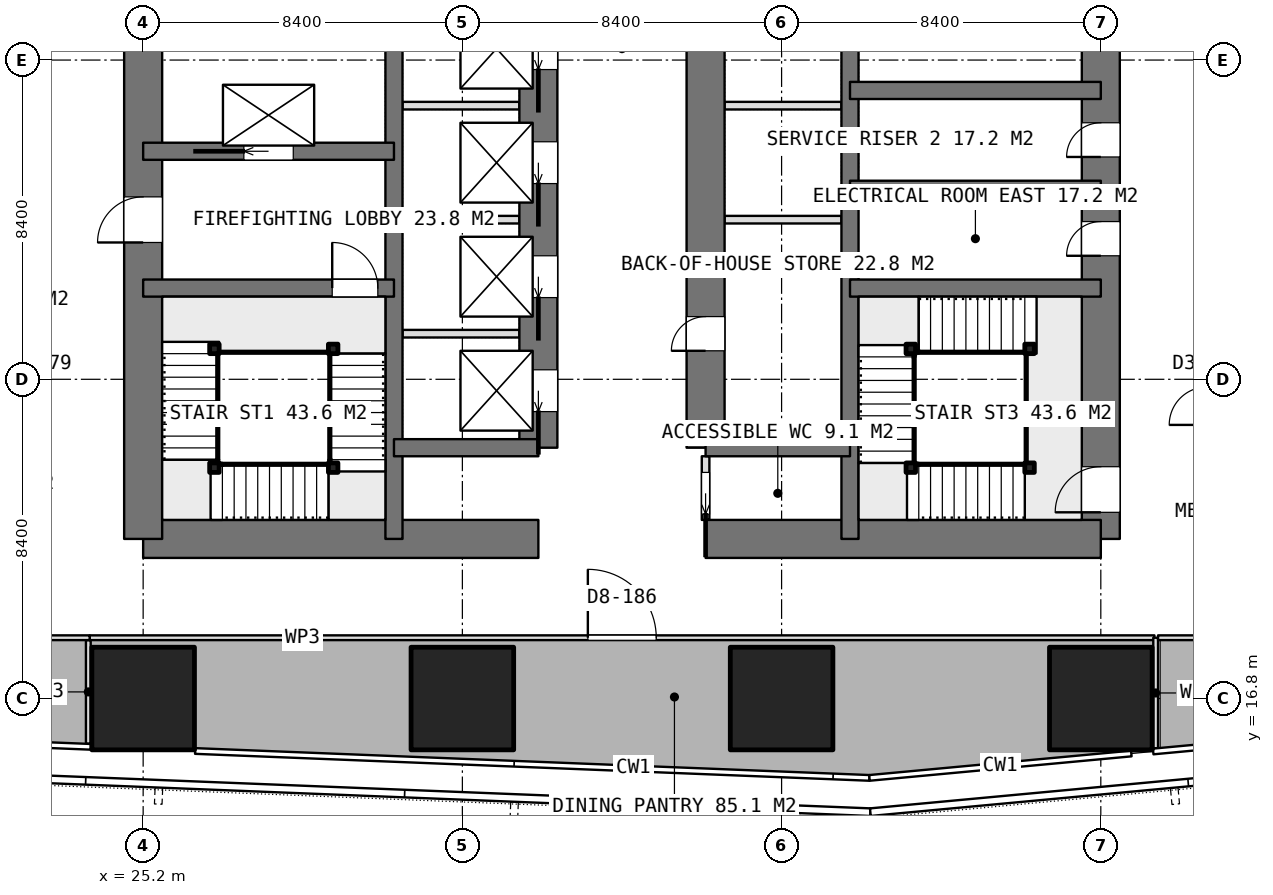
"""IFC4 building model, lengths in metres.
Left out: names, types, materials, properties, quantities, classifications, styles, units other than length and angle.
Written with IfcOpenShell. Run it as: python <this file> out.ifc"""

import sys

from ifc_helpers import new_model, si_unit, direction, frame, frame_2d, origin, origin_2d, place, context, subcontext, project, spatial, rectangle, extrude, element, fill, save


model = new_model("IFC4")
c1 = context("Model", 3, precision=1e-05, world=origin(), true_north=direction((0.0, 1.0)))
c2 = subcontext(c1, "Body", "Model", "MODEL_VIEW")
j1 = project(units=[si_unit("LENGTHUNIT", "METRE"), si_unit("PLANEANGLEUNIT", "RADIAN")], contexts=[c1])
p1 = place(None, origin())
s1 = spatial("IfcSite", under=j1, at=p1, CompositionType="ELEMENT")
p2 = place(p1, origin())
s2 = spatial("IfcBuilding", under=s1, at=p2, CompositionType="ELEMENT")
p3 = place(p2, frame((0.0, 0.0, 172.7)))
s3 = spatial("IfcBuildingStorey", under=s2, at=p3, CompositionType="ELEMENT", Elevation=172.7)
p4 = place(p3, frame((25.2, 21.0, 0.0), z_axis=(0.0, 0.0, 1.0), x_axis=(1.0, 0.0, 0.0)))
e1 = element("IfcWall", 1, at=p4, inside=s3, PredefinedType="SHEAR", context=c2, shape_type="SweptSolid", body=[
    extrude(rectangle(XDim=10.4, YDim=1.0, at=frame_2d((5.2, 0.0))), origin(), (0.0, 0.0, 1.0), 3.75),
])
p5 = place(p3, frame((40.0, 21.0, 0.0), z_axis=(0.0, 0.0, 1.0), x_axis=(1.0, 0.0, 0.0)))
e2 = element("IfcWall", 2, at=p5, inside=s3, PredefinedType="SHEAR", context=c2, shape_type="SweptSolid", body=[
    extrude(rectangle(XDim=10.4, YDim=1.0, at=frame_2d((5.2, 0.0))), origin(), (0.0, 0.0, 1.0), 3.75),
])
p6 = place(p3, frame((25.2, 21.0, 0.0), z_axis=(0.0, 0.0, 1.0), x_axis=(0.0, 1.0, 0.0)))
e3 = element("IfcWall", 3, at=p6, inside=s3, PredefinedType="SHEAR", context=c2, shape_type="SweptSolid", body=[
    extrude(rectangle(XDim=25.2, YDim=1.0, at=frame_2d((12.6, 0.0))), origin(), (0.0, 0.0, 1.0), 3.75),
])
p7 = place(p6, frame((7.8, 0.0, 0.0)))
e4 = element("IfcOpeningElement", 4, at=p7, cuts=e3, PredefinedType="OPENING", context=c2, shape_type="SweptSolid", body=[
    extrude(rectangle(XDim=1.2, YDim=2.1, at=frame_2d((0.6, 1.05))), frame((0.0, 0.51, 0.0), z_axis=(0.0, -1.0, 0.0), x_axis=(1.0, 0.0, 0.0)), (0.0, 0.0, 1.0), 1.02),
])
p8 = place(p6, frame((14.25, 0.0, 0.0)))
e5 = element("IfcOpeningElement", 5, at=p8, cuts=e3, PredefinedType="OPENING", context=c2, shape_type="SweptSolid", body=[
    extrude(rectangle(XDim=0.9, YDim=2.1, at=frame_2d((0.45, 1.05))), frame((0.0, 0.51, 0.0), z_axis=(0.0, -1.0, 0.0), x_axis=(1.0, 0.0, 0.0)), (0.0, 0.0, 1.0), 1.02),
])
p9 = place(p6, frame((16.85, 0.0, 0.0)))
e6 = element("IfcOpeningElement", 6, at=p9, cuts=e3, PredefinedType="OPENING", context=c2, shape_type="SweptSolid", body=[
    extrude(rectangle(XDim=0.9, YDim=2.1, at=frame_2d((0.45, 1.05))), frame((0.0, 0.51, 0.0), z_axis=(0.0, -1.0, 0.0), x_axis=(1.0, 0.0, 0.0)), (0.0, 0.0, 1.0), 1.02),
])
p10 = place(p6, frame((19.025, 0.0, 0.0)))
e7 = element("IfcOpeningElement", 7, at=p10, cuts=e3, PredefinedType="OPENING", context=c2, shape_type="SweptSolid", body=[
    extrude(rectangle(XDim=1.2, YDim=2.1, at=frame_2d((0.6, 1.05))), frame((0.0, 0.51, 0.0), z_axis=(0.0, -1.0, 0.0), x_axis=(1.0, 0.0, 0.0)), (0.0, 0.0, 1.0), 1.02),
])
p11 = place(p3, frame((50.4, 21.0, 0.0), z_axis=(0.0, 0.0, 1.0), x_axis=(0.0, 1.0, 0.0)))
e8 = element("IfcWall", 8, at=p11, inside=s3, PredefinedType="SHEAR", context=c2, shape_type="SweptSolid", body=[
    extrude(rectangle(XDim=25.2, YDim=1.0, at=frame_2d((12.6, 0.0))), origin(), (0.0, 0.0, 1.0), 3.75),
])
p12 = place(p11, frame((16.2, 0.0, 0.0)))
e9 = element("IfcOpeningElement", 9, at=p12, cuts=e8, PredefinedType="OPENING", context=c2, shape_type="SweptSolid", body=[
    extrude(rectangle(XDim=1.2, YDim=2.1, at=frame_2d((0.6, 1.05))), frame((0.0, 0.51, 0.0), z_axis=(0.0, -1.0, 0.0), x_axis=(1.0, 0.0, 0.0)), (0.0, 0.0, 1.0), 1.02),
])
p13 = place(p11, frame((10.05, 0.0, 0.0)))
e10 = element("IfcOpeningElement", 10, at=p13, cuts=e8, PredefinedType="OPENING", context=c2, shape_type="SweptSolid", body=[
    extrude(rectangle(XDim=0.9, YDim=2.1, at=frame_2d((0.45, 1.05))), frame((0.0, 0.51, 0.0), z_axis=(0.0, -1.0, 0.0), x_axis=(1.0, 0.0, 0.0)), (0.0, 0.0, 1.0), 1.02),
])
p14 = place(p11, frame((7.45, 0.0, 0.0)))
e11 = element("IfcOpeningElement", 11, at=p14, cuts=e8, PredefinedType="OPENING", context=c2, shape_type="SweptSolid", body=[
    extrude(rectangle(XDim=0.9, YDim=2.1, at=frame_2d((0.45, 1.05))), frame((0.0, 0.51, 0.0), z_axis=(0.0, -1.0, 0.0), x_axis=(1.0, 0.0, 0.0)), (0.0, 0.0, 1.0), 1.02),
])
p15 = place(p11, frame((0.7, 0.0, 0.0)))
e12 = element("IfcOpeningElement", 12, at=p15, cuts=e8, PredefinedType="OPENING", context=c2, shape_type="SweptSolid", body=[
    extrude(rectangle(XDim=1.2, YDim=2.1, at=frame_2d((0.6, 1.05))), frame((0.0, 0.51, 0.0), z_axis=(0.0, -1.0, 0.0), x_axis=(1.0, 0.0, 0.0)), (0.0, 0.0, 1.0), 1.02),
])
for number, where, z_axis, x_axis in (
    (13, (31.8, 21.0, 0.0), (0.0, 0.0, 1.0), (0.0, 1.0, 0.0)),
    (14, (43.8, 21.0, 0.0), (0.0, 0.0, 1.0), (0.0, 1.0, 0.0)),
):
    element("IfcWall", number, at=place(p3, frame(where, z_axis=z_axis, x_axis=x_axis)), inside=s3, PredefinedType="SHEAR", context=c2, shape_type="SweptSolid", body=[
        extrude(rectangle(XDim=25.2, YDim=0.45, at=frame_2d((12.6, 0.0))), origin(), (0.0, 0.0, 1.0), 3.75),
    ])
p16 = place(p3, frame((35.6, 23.4, 0.0), z_axis=(0.0, 0.0, 1.0), x_axis=(0.0, 1.0, 0.0)))
e15 = element("IfcWall", 15, at=p16, inside=s3, PredefinedType="SHEAR", context=c2, shape_type="SweptSolid", body=[
    extrude(rectangle(XDim=18.0, YDim=1.0, at=frame_2d((9.0, 0.0))), origin(), (0.0, 0.0, 1.0), 3.75),
])
p17 = place(p16, frame((0.95, 0.0, 0.0)))
e16 = element("IfcOpeningElement", 16, at=p17, cuts=e15, PredefinedType="OPENING", context=c2, shape_type="SweptSolid", body=[
    extrude(rectangle(XDim=1.1, YDim=2.1, at=frame_2d((0.55, 1.05))), frame((0.0, 0.51, 0.0), z_axis=(0.0, -1.0, 0.0), x_axis=(1.0, 0.0, 0.0)), (0.0, 0.0, 1.0), 1.02),
])
p18 = place(p16, frame((3.95, 0.0, 0.0)))
e17 = element("IfcOpeningElement", 17, at=p18, cuts=e15, PredefinedType="OPENING", context=c2, shape_type="SweptSolid", body=[
    extrude(rectangle(XDim=1.1, YDim=2.1, at=frame_2d((0.55, 1.05))), frame((0.0, 0.51, 0.0), z_axis=(0.0, -1.0, 0.0), x_axis=(1.0, 0.0, 0.0)), (0.0, 0.0, 1.0), 1.02),
])
p19 = place(p16, frame((6.95, 0.0, 0.0)))
e18 = element("IfcOpeningElement", 18, at=p19, cuts=e15, PredefinedType="OPENING", context=c2, shape_type="SweptSolid", body=[
    extrude(rectangle(XDim=1.1, YDim=2.1, at=frame_2d((0.55, 1.05))), frame((0.0, 0.51, 0.0), z_axis=(0.0, -1.0, 0.0), x_axis=(1.0, 0.0, 0.0)), (0.0, 0.0, 1.0), 1.02),
])
p20 = place(p16, frame((9.95, 0.0, 0.0)))
e19 = element("IfcOpeningElement", 19, at=p20, cuts=e15, PredefinedType="OPENING", context=c2, shape_type="SweptSolid", body=[
    extrude(rectangle(XDim=1.1, YDim=2.1, at=frame_2d((0.55, 1.05))), frame((0.0, 0.51, 0.0), z_axis=(0.0, -1.0, 0.0), x_axis=(1.0, 0.0, 0.0)), (0.0, 0.0, 1.0), 1.02),
])
p21 = place(p16, frame((12.95, 0.0, 0.0)))
e20 = element("IfcOpeningElement", 20, at=p21, cuts=e15, PredefinedType="OPENING", context=c2, shape_type="SweptSolid", body=[
    extrude(rectangle(XDim=1.1, YDim=2.1, at=frame_2d((0.55, 1.05))), frame((0.0, 0.51, 0.0), z_axis=(0.0, -1.0, 0.0), x_axis=(1.0, 0.0, 0.0)), (0.0, 0.0, 1.0), 1.02),
])
p22 = place(p16, frame((15.95, 0.0, 0.0)))
e21 = element("IfcOpeningElement", 21, at=p22, cuts=e15, PredefinedType="OPENING", context=c2, shape_type="SweptSolid", body=[
    extrude(rectangle(XDim=1.1, YDim=2.1, at=frame_2d((0.55, 1.05))), frame((0.0, 0.51, 0.0), z_axis=(0.0, -1.0, 0.0), x_axis=(1.0, 0.0, 0.0)), (0.0, 0.0, 1.0), 1.02),
])
p23 = place(p3, frame((40.0, 23.4, 0.0), z_axis=(0.0, 0.0, 1.0), x_axis=(0.0, 1.0, 0.0)))
e22 = element("IfcWall", 22, at=p23, inside=s3, PredefinedType="SHEAR", context=c2, shape_type="SweptSolid", body=[
    extrude(rectangle(XDim=18.0, YDim=1.0, at=frame_2d((9.0, 0.0))), origin(), (0.0, 0.0, 1.0), 3.75),
])
p24 = place(p23, frame((2.55, 0.0, 0.0)))
e23 = element("IfcOpeningElement", 23, at=p24, cuts=e22, PredefinedType="OPENING", context=c2, shape_type="SweptSolid", body=[
    extrude(rectangle(XDim=0.9, YDim=2.1, at=frame_2d((0.45, 1.05))), frame((0.0, 0.51, 0.0), z_axis=(0.0, -1.0, 0.0), x_axis=(1.0, 0.0, 0.0)), (0.0, 0.0, 1.0), 1.02),
])
for number, where, z_axis, x_axis in (
    (24, (31.8, 23.4, 0.0), (0.0, 0.0, 1.0), (1.0, 0.0, 0.0)),
    (25, (40.0, 23.4, 0.0), (0.0, 0.0, 1.0), (1.0, 0.0, 0.0)),
):
    element("IfcWall", number, at=place(p3, frame(where, z_axis=z_axis, x_axis=x_axis)), inside=s3, PredefinedType="SHEAR", context=c2, shape_type="SweptSolid", body=[
        extrude(rectangle(XDim=3.8, YDim=0.45, at=frame_2d((1.9, 0.0))), origin(), (0.0, 0.0, 1.0), 3.75),
    ])
p25 = place(p3, frame((25.2, 27.6, 0.0), z_axis=(0.0, 0.0, 1.0), x_axis=(1.0, 0.0, 0.0)))
e26 = element("IfcWall", 26, at=p25, inside=s3, PredefinedType="SHEAR", context=c2, shape_type="SweptSolid", body=[
    extrude(rectangle(XDim=6.6, YDim=0.45, at=frame_2d((3.3, 0.0))), origin(), (0.0, 0.0, 1.0), 3.75),
])
p26 = place(p25, frame((4.975, 0.0, 0.0)))
e27 = element("IfcOpeningElement", 27, at=p26, cuts=e26, PredefinedType="OPENING", context=c2, shape_type="SweptSolid", body=[
    extrude(rectangle(XDim=1.2, YDim=2.1, at=frame_2d((0.6, 1.05))), frame((0.0, 0.235, 0.0), z_axis=(0.0, -1.0, 0.0), x_axis=(1.0, 0.0, 0.0)), (0.0, 0.0, 1.0), 0.47),
])
p27 = place(p3, frame((25.2, 31.2, 0.0), z_axis=(0.0, 0.0, 1.0), x_axis=(1.0, 0.0, 0.0)))
e28 = element("IfcWall", 28, at=p27, inside=s3, PredefinedType="SHEAR", context=c2, shape_type="SweptSolid", body=[
    extrude(rectangle(XDim=6.6, YDim=0.45, at=frame_2d((3.3, 0.0))), origin(), (0.0, 0.0, 1.0), 3.75),
])
p28 = place(p27, frame((2.65, 0.0, 0.0)))
e29 = element("IfcOpeningElement", 29, at=p28, cuts=e28, PredefinedType="OPENING", context=c2, shape_type="SweptSolid", body=[
    extrude(rectangle(XDim=1.3, YDim=2.1, at=frame_2d((0.65, 1.05))), frame((0.0, 0.235, 0.0), z_axis=(0.0, -1.0, 0.0), x_axis=(1.0, 0.0, 0.0)), (0.0, 0.0, 1.0), 0.47),
])
for number, where, z_axis, x_axis in (
    (30, (43.8, 27.6, 0.0), (0.0, 0.0, 1.0), (1.0, 0.0, 0.0)),
    (31, (43.8, 30.2, 0.0), (0.0, 0.0, 1.0), (1.0, 0.0, 0.0)),
    (32, (43.8, 32.8, 0.0), (0.0, 0.0, 1.0), (1.0, 0.0, 0.0)),
):
    element("IfcWall", number, at=place(p3, frame(where, z_axis=z_axis, x_axis=x_axis)), inside=s3, PredefinedType="SHEAR", context=c2, shape_type="SweptSolid", body=[
        extrude(rectangle(XDim=6.6, YDim=0.45, at=frame_2d((3.3, 0.0))), origin(), (0.0, 0.0, 1.0), 3.75),
    ])
for number, where, z_axis, x_axis in (
    (33, (25.2, 16.8, 0.0), (0.0, 0.0, 1.0), (1.0, 0.0, 0.0)),
    (34, (33.6, 16.8, 0.0), (0.0, 0.0, 1.0), (1.0, 0.0, 0.0)),
    (35, (42.0, 16.8, 0.0), (0.0, 0.0, 1.0), (1.0, 0.0, 0.0)),
    (36, (50.4, 16.8, 0.0), (0.0, 0.0, 1.0), (1.0, 0.0, 0.0)),
):
    element("IfcColumn", number, at=place(p3, frame(where, z_axis=z_axis, x_axis=x_axis)), inside=s3, PredefinedType="COLUMN", context=c2, shape_type="SweptSolid", body=[
        extrude(rectangle(XDim=2.7, YDim=2.7, at=origin_2d()), origin(), (0.0, 0.0, 1.0), 3.75),
    ])
for number, where, z_axis, x_axis in (
    (37, (32.025, 26.4, 0.0), (0.0, 0.0, 1.0), (1.0, 0.0, 0.0)),
    (38, (32.025, 29.4, 0.0), (0.0, 0.0, 1.0), (1.0, 0.0, 0.0)),
    (39, (32.025, 32.4, 0.0), (0.0, 0.0, 1.0), (1.0, 0.0, 0.0)),
):
    element("IfcWall", number, at=place(p3, frame(where, z_axis=z_axis, x_axis=x_axis)), inside=s3, PredefinedType="PARTITIONING", context=c2, shape_type="SweptSolid", body=[
        extrude(rectangle(XDim=3.075, YDim=0.2, at=frame_2d((1.538, 0.0))), origin(), (0.0, 0.0, 1.0), 3.5),
    ])
for number, where, z_axis, x_axis in (
    (40, (40.5, 29.4, 0.0), (0.0, 0.0, 1.0), (1.0, 0.0, 0.0)),
    (41, (40.5, 32.4, 0.0), (0.0, 0.0, 1.0), (1.0, 0.0, 0.0)),
):
    element("IfcWall", number, at=place(p3, frame(where, z_axis=z_axis, x_axis=x_axis)), inside=s3, PredefinedType="PARTITIONING", context=c2, shape_type="SweptSolid", body=[
        extrude(rectangle(XDim=3.075, YDim=0.2, at=frame_2d((1.538, 0.0))), origin(), (0.0, 0.0, 1.0), 3.5),
    ])
p29 = place(p3, frame((40.0, 21.5, 0.0), z_axis=(0.0, 0.0, 1.0), x_axis=(0.0, 1.0, 0.0)))
e42 = element("IfcWall", 42, at=p29, inside=s3, PredefinedType="PARTITIONING", context=c2, shape_type="SweptSolid", body=[
    extrude(rectangle(XDim=1.675, YDim=0.2, at=frame_2d((0.837, 0.0))), origin(), (0.0, 0.0, 1.0), 3.5),
])
p30 = place(p29, frame((0.15, 0.0, 0.0)))
e43 = element("IfcOpeningElement", 43, at=p30, cuts=e42, PredefinedType="OPENING", context=c2, shape_type="SweptSolid", body=[
    extrude(rectangle(XDim=1.1, YDim=2.1, at=frame_2d((0.55, 1.05))), frame((0.0, 0.11, 0.0), z_axis=(0.0, -1.0, 0.0), x_axis=(1.0, 0.0, 0.0)), (0.0, 0.0, 1.0), 0.22),
])
p31 = place(p3, frame((23.757, 15.612, 0.0), z_axis=(0.0, 0.0, 1.0), x_axis=(0.0, 1.0, 0.0)))
e44 = element("IfcWall", 44, at=p31, inside=s3, PredefinedType="PARTITIONING", context=c2, shape_type="SweptSolid", body=[
    extrude(rectangle(XDim=2.725, YDim=0.125, at=frame_2d((1.362, 0.0))), origin(), (0.0, 0.0, 1.0), 3.5),
])
p32 = place(p3, frame((23.793, 18.4, 0.0), z_axis=(0.0, 0.0, 1.0), x_axis=(1.0, 0.0, 0.0)))
e45 = element("IfcWall", 45, at=p32, inside=s3, PredefinedType="PARTITIONING", context=c2, shape_type="SweptSolid", body=[
    extrude(rectangle(XDim=28.018, YDim=0.125, at=frame_2d((14.009, 0.0))), origin(), (0.0, 0.0, 1.0), 3.5),
])
p33 = place(p32, frame((13.109, 0.0, 0.0)))
e46 = element("IfcOpeningElement", 46, at=p33, cuts=e45, PredefinedType="OPENING", context=c2, shape_type="SweptSolid", body=[
    extrude(rectangle(XDim=1.8, YDim=2.1, at=frame_2d((0.9, 1.05))), frame((0.0, 0.073, 0.0), z_axis=(0.0, -1.0, 0.0), x_axis=(1.0, 0.0, 0.0)), (0.0, 0.0, 1.0), 0.145),
])
p34 = place(p3, frame((51.843, 18.4, 0.0), z_axis=(0.0, 0.0, 1.0), x_axis=(0.0, -1.0, 0.0)))
e47 = element("IfcWall", 47, at=p34, inside=s3, PredefinedType="PARTITIONING", context=c2, shape_type="SweptSolid", body=[
    extrude(rectangle(XDim=2.907, YDim=0.125, at=frame_2d((1.454, 0.0))), origin(), (0.0, 0.0, 1.0), 3.5),
])
p35 = place(p3, frame((51.906, 18.4, 0.0), z_axis=(0.0, 0.0, 1.0), x_axis=(1.0, 0.0, 0.0)))
e48 = element("IfcWall", 48, at=p35, inside=s3, PredefinedType="PARTITIONING", context=c2, shape_type="SweptSolid", body=[
    extrude(rectangle(XDim=4.494, YDim=0.125, at=frame_2d((2.247, 0.0))), origin(), (0.0, 0.0, 1.0), 3.5),
])
p36 = place(p35, frame((1.374, 0.0, 0.0)))
e49 = element("IfcOpeningElement", 49, at=p36, cuts=e48, PredefinedType="OPENING", context=c2, shape_type="SweptSolid", body=[
    extrude(rectangle(XDim=1.8, YDim=2.1, at=frame_2d((0.9, 1.05))), frame((0.0, 0.073, 0.0), z_axis=(0.0, -1.0, 0.0), x_axis=(1.0, 0.0, 0.0)), (0.0, 0.0, 1.0), 0.145),
])
p37 = place(p3, frame((19.261, 18.4, 0.0), z_axis=(0.0, 0.0, 1.0), x_axis=(1.0, 0.0, 0.0)))
e50 = element("IfcWall", 50, at=p37, inside=s3, PredefinedType="PARTITIONING", context=c2, shape_type="SweptSolid", body=[
    extrude(rectangle(XDim=4.532, YDim=0.125, at=frame_2d((2.266, 0.0))), origin(), (0.0, 0.0, 1.0), 3.5),
])
p38 = place(p37, frame((1.736, 0.0, 0.0)))
e51 = element("IfcOpeningElement", 51, at=p38, cuts=e50, PredefinedType="OPENING", context=c2, shape_type="SweptSolid", body=[
    extrude(rectangle(XDim=1.0, YDim=2.1, at=frame_2d((0.5, 1.05))), frame((0.0, 0.073, 0.0), z_axis=(0.0, -1.0, 0.0), x_axis=(1.0, 0.0, 0.0)), (0.0, 0.0, 1.0), 0.145),
])
for number, where, z_axis, x_axis in (
    (52, (30.2, 26.0, 0.0), (0.0, 0.0, 1.0), (1.0, 0.0, 0.0)),
    (53, (30.2, 22.875, 0.0), (0.0, 0.0, 1.0), (1.0, 0.0, 0.0)),
    (54, (27.075, 22.875, 0.0), (0.0, 0.0, 1.0), (1.0, 0.0, 0.0)),
    (55, (27.075, 26.0, 0.0), (0.0, 0.0, 1.0), (1.0, 0.0, 0.0)),
    (56, (48.525, 22.875, 0.0), (0.0, 0.0, 1.0), (1.0, 0.0, 0.0)),
    (57, (45.4, 22.875, 0.0), (0.0, 0.0, 1.0), (1.0, 0.0, 0.0)),
    (58, (45.4, 26.0, 0.0), (0.0, 0.0, 1.0), (1.0, 0.0, 0.0)),
    (59, (48.525, 26.0, 0.0), (0.0, 0.0, 1.0), (1.0, 0.0, 0.0)),
):
    element("IfcColumn", number, at=place(p3, frame(where, z_axis=z_axis, x_axis=x_axis)), inside=s3, PredefinedType="COLUMN", context=c2, shape_type="SweptSolid", body=[
        extrude(rectangle(XDim=0.25, YDim=0.25, at=origin_2d()), origin(), (0.0, 0.0, 1.0), 3.75),
    ])
p39 = place(p7, origin())
e60 = element("IfcDoor", 60, at=p39, inside=s3, OperationType="SINGLE_SWING_LEFT", PredefinedType="DOOR", context=c2, shape_type="SweptSolid", body=[
    extrude(rectangle(XDim=1.2, YDim=2.1, at=frame_2d((0.6, 1.05))), frame((0.0, 0.025, 0.0), z_axis=(0.0, -1.0, 0.0), x_axis=(1.0, 0.0, 0.0)), (0.0, 0.0, 1.0), 0.05),
])
fill(e4, e60)
p40 = place(p13, origin())
e61 = element("IfcDoor", 61, at=p40, inside=s3, OperationType="SINGLE_SWING_LEFT", PredefinedType="DOOR", context=c2, shape_type="SweptSolid", body=[
    extrude(rectangle(XDim=0.9, YDim=2.1, at=frame_2d((0.45, 1.05))), frame((0.0, 0.025, 0.0), z_axis=(0.0, -1.0, 0.0), x_axis=(1.0, 0.0, 0.0)), (0.0, 0.0, 1.0), 0.05),
])
fill(e10, e61)
p41 = place(p14, origin())
e62 = element("IfcDoor", 62, at=p41, inside=s3, OperationType="SINGLE_SWING_LEFT", PredefinedType="DOOR", context=c2, shape_type="SweptSolid", body=[
    extrude(rectangle(XDim=0.9, YDim=2.1, at=frame_2d((0.45, 1.05))), frame((0.0, 0.025, 0.0), z_axis=(0.0, -1.0, 0.0), x_axis=(1.0, 0.0, 0.0)), (0.0, 0.0, 1.0), 0.05),
])
fill(e11, e62)
p42 = place(p30, origin())
e63 = element("IfcDoor", 63, at=p42, inside=s3, OperationType="SLIDING_TO_LEFT", PredefinedType="DOOR", context=c2, shape_type="SweptSolid", body=[
    extrude(rectangle(XDim=1.1, YDim=2.1, at=frame_2d((0.55, 1.05))), frame((0.0, 0.025, 0.0), z_axis=(0.0, -1.0, 0.0), x_axis=(1.0, 0.0, 0.0)), (0.0, 0.0, 1.0), 0.05),
])
fill(e43, e63)
p43 = place(p24, origin())
e64 = element("IfcDoor", 64, at=p43, inside=s3, OperationType="SINGLE_SWING_LEFT", PredefinedType="DOOR", context=c2, shape_type="SweptSolid", body=[
    extrude(rectangle(XDim=0.9, YDim=2.1, at=frame_2d((0.45, 1.05))), frame((0.0, 0.025, 0.0), z_axis=(0.0, -1.0, 0.0), x_axis=(1.0, 0.0, 0.0)), (0.0, 0.0, 1.0), 0.05),
])
fill(e23, e64)
p44 = place(p17, origin())
e65 = element("IfcDoor", 65, at=p44, inside=s3, OperationType="SLIDING_TO_LEFT", PredefinedType="USERDEFINED", context=c2, shape_type="SweptSolid", body=[
    extrude(rectangle(XDim=1.1, YDim=2.1, at=frame_2d((0.55, 1.05))), frame((0.0, 0.025, 0.0), z_axis=(0.0, -1.0, 0.0), x_axis=(1.0, 0.0, 0.0)), (0.0, 0.0, 1.0), 0.05),
])
fill(e16, e65)
p45 = place(p18, origin())
e66 = element("IfcDoor", 66, at=p45, inside=s3, OperationType="SLIDING_TO_LEFT", PredefinedType="USERDEFINED", context=c2, shape_type="SweptSolid", body=[
    extrude(rectangle(XDim=1.1, YDim=2.1, at=frame_2d((0.55, 1.05))), frame((0.0, 0.025, 0.0), z_axis=(0.0, -1.0, 0.0), x_axis=(1.0, 0.0, 0.0)), (0.0, 0.0, 1.0), 0.05),
])
fill(e17, e66)
p46 = place(p19, origin())
e67 = element("IfcDoor", 67, at=p46, inside=s3, OperationType="SLIDING_TO_LEFT", PredefinedType="USERDEFINED", context=c2, shape_type="SweptSolid", body=[
    extrude(rectangle(XDim=1.1, YDim=2.1, at=frame_2d((0.55, 1.05))), frame((0.0, 0.025, 0.0), z_axis=(0.0, -1.0, 0.0), x_axis=(1.0, 0.0, 0.0)), (0.0, 0.0, 1.0), 0.05),
])
fill(e18, e67)
p47 = place(p20, origin())
e68 = element("IfcDoor", 68, at=p47, inside=s3, OperationType="SLIDING_TO_LEFT", PredefinedType="USERDEFINED", context=c2, shape_type="SweptSolid", body=[
    extrude(rectangle(XDim=1.1, YDim=2.1, at=frame_2d((0.55, 1.05))), frame((0.0, 0.025, 0.0), z_axis=(0.0, -1.0, 0.0), x_axis=(1.0, 0.0, 0.0)), (0.0, 0.0, 1.0), 0.05),
])
fill(e19, e68)
p48 = place(p28, origin())
e69 = element("IfcDoor", 69, at=p48, inside=s3, OperationType="SLIDING_TO_LEFT", PredefinedType="USERDEFINED", context=c2, shape_type="SweptSolid", body=[
    extrude(rectangle(XDim=1.3, YDim=2.1, at=frame_2d((0.65, 1.05))), frame((0.0, 0.025, 0.0), z_axis=(0.0, -1.0, 0.0), x_axis=(1.0, 0.0, 0.0)), (0.0, 0.0, 1.0), 0.05),
])
fill(e29, e69)
p49 = place(p33, origin())
e70 = element("IfcDoor", 70, at=p49, inside=s3, OperationType="DOUBLE_DOOR_SINGLE_SWING", PredefinedType="DOOR", context=c2, shape_type="SweptSolid", body=[
    extrude(rectangle(XDim=1.8, YDim=2.1, at=frame_2d((0.9, 1.05))), frame((0.0, 0.025, 0.0), z_axis=(0.0, -1.0, 0.0), x_axis=(1.0, 0.0, 0.0)), (0.0, 0.0, 1.0), 0.05),
])
fill(e46, e70)
p50 = place(p26, origin())
e71 = element("IfcDoor", 71, at=p50, inside=s3, OperationType="SINGLE_SWING_RIGHT", PredefinedType="DOOR", context=c2, shape_type="SweptSolid", body=[
    extrude(rectangle(XDim=1.2, YDim=2.1, at=frame_2d((0.6, 1.05))), frame((0.0, 0.025, 0.0), z_axis=(0.0, -1.0, 0.0), x_axis=(1.0, 0.0, 0.0)), (0.0, 0.0, 1.0), 0.05),
])
fill(e27, e71)
p51 = place(p15, origin())
e72 = element("IfcDoor", 72, at=p51, inside=s3, OperationType="SINGLE_SWING_RIGHT", PredefinedType="DOOR", context=c2, shape_type="SweptSolid", body=[
    extrude(rectangle(XDim=1.2, YDim=2.1, at=frame_2d((0.6, 1.05))), frame((0.0, 0.025, 0.0), z_axis=(0.0, -1.0, 0.0), x_axis=(1.0, 0.0, 0.0)), (0.0, 0.0, 1.0), 0.05),
])
fill(e12, e72)
save(model, sys.argv[1])
